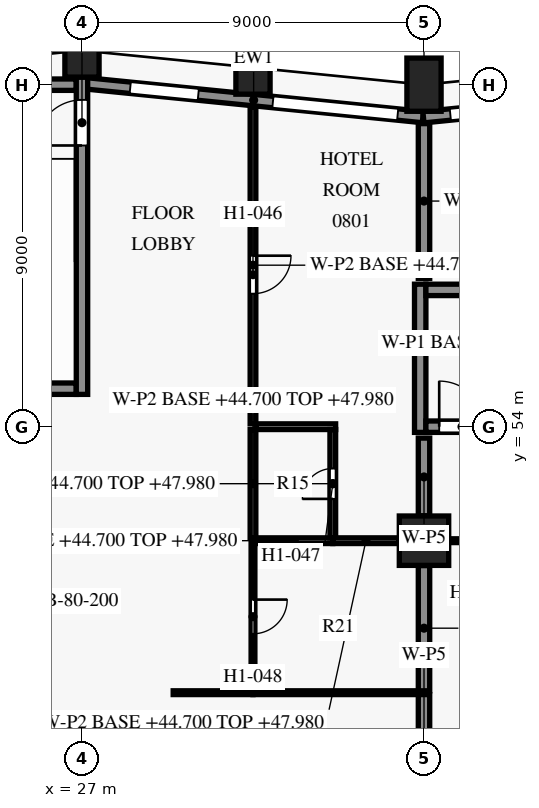
"""IFC4 building model, lengths in metres.
Left out: names, types, materials, properties, quantities, classifications, styles, units other than length and angle.
Written with IfcOpenShell. Run it as: python <this file> out.ifc"""

import sys

from ifc_helpers import new_model, si_unit, direction, frame, frame_2d, origin, origin_2d, place, context, subcontext, project, spatial, rectangle, extrude, element, fill, save


model = new_model("IFC4")
c1 = context("Model", 3, precision=1e-05, world=origin(), true_north=direction((0.0, 1.0)))
c2 = subcontext(c1, "Body", "Model", "MODEL_VIEW")
j1 = project(units=[si_unit("LENGTHUNIT", "METRE"), si_unit("PLANEANGLEUNIT", "RADIAN")], contexts=[c1])
p1 = place(None, origin())
s1 = spatial("IfcSite", under=j1, at=p1, CompositionType="ELEMENT")
p2 = place(p1, origin())
s2 = spatial("IfcBuilding", under=s1, at=p2, CompositionType="ELEMENT")
p3 = place(p2, frame((0.0, 0.0, 44.7)))
s3 = spatial("IfcBuildingStorey", under=s2, at=p3, CompositionType="ELEMENT", Elevation=44.7)
for number, where, z_axis, x_axis in (
    (1, (36.0, 63.0, 0.0), (0.0, 0.0, 1.0), (-1.0, 0.0, 0.0)),
    (2, (31.5, 63.45, 0.0), (0.0, 0.0, 1.0), (-0.995, 0.1, 0.0)),
    (3, (27.0, 63.9, 0.0), (0.0, 0.0, 1.0), (-1.0, 0.0, 0.0)),
):
    element("IfcColumn", number, at=place(p3, frame(where, z_axis=z_axis, x_axis=x_axis)), inside=s3, PredefinedType="COLUMN", context=c2, shape_type="SweptSolid", body=[
        extrude(rectangle(XDim=0.9, YDim=1.4, at=origin_2d()), origin(), (0.0, 0.0, 1.0), 3.6),
    ])
p4 = place(p3, frame((36.0, 51.0, 0.0), z_axis=(0.0, 0.0, 1.0), x_axis=(1.0, 0.0, 0.0)))
e4 = element("IfcColumn", 4, at=p4, inside=s3, PredefinedType="COLUMN", context=c2, shape_type="SweptSolid", body=[
    extrude(rectangle(XDim=1.3, YDim=1.3, at=origin_2d()), origin(), (0.0, 0.0, 1.0), 3.6),
])
p5 = place(p3, frame((35.985, 62.144, 0.0), z_axis=(0.0, 0.0, 1.0), x_axis=(0.995037993253, 0.099495688264, 0.0)))
e5 = element("IfcWall", 5, at=p5, inside=s3, PredefinedType="SOLIDWALL", context=c2, shape_type="SweptSolid", body=[
    extrude(rectangle(XDim=9.03, YDim=0.3, at=frame_2d((4.515, 0.0))), origin(), (0.0, 0.0, 1.0), 2.95),
])
p6 = place(p5, frame((0.711, 0.0, 0.15)))
e6 = element("IfcOpeningElement", 6, at=p6, cuts=e5, PredefinedType="OPENING", context=c2, shape_type="SweptSolid", body=[
    extrude(rectangle(XDim=3.3, YDim=2.4, at=frame_2d((1.65, 1.2))), frame((0.0, 0.16, 0.0), z_axis=(0.0, -1.0, 0.0), x_axis=(1.0, 0.0, 0.0)), (0.0, 0.0, 1.0), 0.32),
])
p7 = place(p5, frame((5.984, 0.0, 0.75)))
e7 = element("IfcOpeningElement", 7, at=p7, cuts=e5, PredefinedType="OPENING", context=c2, shape_type="SweptSolid", body=[
    extrude(rectangle(XDim=1.8, YDim=1.8, at=frame_2d((0.9, 0.9))), frame((0.0, 0.16, 0.0), z_axis=(0.0, -1.0, 0.0), x_axis=(1.0, 0.0, 0.0)), (0.0, 0.0, 1.0), 0.32),
])
p8 = place(p3, frame((27.065, 63.039, 0.0), z_axis=(0.0, 0.0, 1.0), x_axis=(0.995036379926, -0.099511821531, 0.0)))
e8 = element("IfcWall", 8, at=p8, inside=s3, PredefinedType="SOLIDWALL", context=c2, shape_type="SweptSolid", body=[
    extrude(rectangle(XDim=8.95, YDim=0.3, at=frame_2d((4.475, 0.0))), origin(), (0.0, 0.0, 1.0), 2.95),
])
p9 = place(p8, frame((1.211, 0.0, 0.75)))
e9 = element("IfcOpeningElement", 9, at=p9, cuts=e8, PredefinedType="OPENING", context=c2, shape_type="SweptSolid", body=[
    extrude(rectangle(XDim=1.8, YDim=1.8, at=frame_2d((0.9, 0.9))), frame((0.0, 0.16, 0.0), z_axis=(0.0, -1.0, 0.0), x_axis=(1.0, 0.0, 0.0)), (0.0, 0.0, 1.0), 0.32),
])
p10 = place(p8, frame((4.984, 0.0, 0.15)))
e10 = element("IfcOpeningElement", 10, at=p10, cuts=e8, PredefinedType="OPENING", context=c2, shape_type="SweptSolid", body=[
    extrude(rectangle(XDim=3.3, YDim=2.4, at=frame_2d((1.65, 1.2))), frame((0.0, 0.16, 0.0), z_axis=(0.0, -1.0, 0.0), x_axis=(1.0, 0.0, 0.0)), (0.0, 0.0, 1.0), 0.32),
])
p11 = place(p3, frame((36.05, 54.0, 0.0), z_axis=(0.0, 0.0, 1.0), x_axis=(1.0, 0.0, 0.0)))
e11 = element("IfcWall", 11, at=p11, inside=s3, PredefinedType="SHEAR", context=c2, shape_type="SweptSolid", body=[
    extrude(rectangle(XDim=7.7, YDim=0.3, at=frame_2d((3.85, 0.0))), origin(), (0.0, 0.0, 1.0), 3.3),
])
p12 = place(p11, frame((0.35, 0.0, 0.0)))
e12 = element("IfcOpeningElement", 12, at=p12, cuts=e11, PredefinedType="OPENING", context=c2, shape_type="SweptSolid", body=[
    extrude(rectangle(XDim=1.2, YDim=2.2, at=frame_2d((0.6, 1.1))), frame((0.0, 0.16, 0.0), z_axis=(0.0, -1.0, 0.0), x_axis=(1.0, 0.0, 0.0)), (0.0, 0.0, 1.0), 0.32),
])
p13 = place(p3, frame((23.4, 55.0, 0.0), z_axis=(0.0, 0.0, 1.0), x_axis=(1.0, 0.0, 0.0)))
e13 = element("IfcWall", 13, at=p13, inside=s3, PredefinedType="SHEAR", context=c2, shape_type="SweptSolid", body=[
    extrude(rectangle(XDim=3.45, YDim=0.3, at=frame_2d((1.725, 0.0))), origin(), (0.0, 0.0, 1.0), 3.3),
])
p14 = place(p3, frame((36.05, 57.6, 0.0), z_axis=(0.0, 0.0, 1.0), x_axis=(1.0, 0.0, 0.0)))
e14 = element("IfcWall", 14, at=p14, inside=s3, PredefinedType="SHEAR", context=c2, shape_type="SweptSolid", body=[
    extrude(rectangle(XDim=7.7, YDim=0.3, at=frame_2d((3.85, 0.0))), origin(), (0.0, 0.0, 1.0), 3.3),
])
p15 = place(p3, frame((23.55, 63.0, 0.0), z_axis=(0.0, 0.0, 1.0), x_axis=(1.0, 0.0, 0.0)))
e15 = element("IfcWall", 15, at=p15, inside=s3, PredefinedType="SHEAR", context=c2, shape_type="SweptSolid", body=[
    extrude(rectangle(XDim=3.3, YDim=0.3, at=frame_2d((1.65, 0.0))), origin(), (0.0, 0.0, 1.0), 3.3),
])
p16 = place(p3, frame((27.0, 54.85, 0.0), z_axis=(0.0, 0.0, 1.0), x_axis=(0.0, 1.0, 0.0)))
e16 = element("IfcWall", 16, at=p16, inside=s3, PredefinedType="SHEAR", context=c2, shape_type="SweptSolid", body=[
    extrude(rectangle(XDim=8.35, YDim=0.3, at=frame_2d((4.175, 0.0))), origin(), (0.0, 0.0, 1.0), 3.3),
])
p17 = place(p16, frame((6.55, 0.0, 0.0)))
e17 = element("IfcOpeningElement", 17, at=p17, cuts=e16, PredefinedType="OPENING", context=c2, shape_type="SweptSolid", body=[
    extrude(rectangle(XDim=1.2, YDim=2.2, at=frame_2d((0.6, 1.1))), frame((0.0, 0.16, 0.0), z_axis=(0.0, -1.0, 0.0), x_axis=(1.0, 0.0, 0.0)), (0.0, 0.0, 1.0), 0.32),
])
p18 = place(p3, frame((35.9, 53.85, 0.0), z_axis=(0.0, 0.0, 1.0), x_axis=(0.0, 1.0, 0.0)))
e18 = element("IfcWall", 18, at=p18, inside=s3, PredefinedType="SHEAR", context=c2, shape_type="SweptSolid", body=[
    extrude(rectangle(XDim=3.9, YDim=0.3, at=frame_2d((1.95, 0.0))), origin(), (0.0, 0.0, 1.0), 3.3),
])
p19 = place(p3, frame((36.0, 46.95, 0.0), z_axis=(0.0, 0.0, 1.0), x_axis=(0.0, -1.0, 0.0)))
e19 = element("IfcWall", 19, at=p19, inside=s3, PredefinedType="PARTITIONING", context=c2, shape_type="SweptSolid", body=[
    extrude(rectangle(XDim=3.7, YDim=0.3, at=frame_2d((1.85, 0.0))), origin(), (0.0, 0.0, 1.0), 2.58),
])
p20 = place(p19, frame((0.95, 0.0, 0.0)))
e20 = element("IfcOpeningElement", 20, at=p20, cuts=e19, PredefinedType="OPENING", context=c2, shape_type="SweptSolid", body=[
    extrude(rectangle(XDim=1.8, YDim=2.1, at=frame_2d((0.9, 1.05))), frame((0.0, 0.16, 0.0), z_axis=(0.0, -1.0, 0.0), x_axis=(1.0, 0.0, 0.0)), (0.0, 0.0, 1.0), 0.32),
])
p21 = place(p3, frame((29.4, 47.0, 0.0), z_axis=(0.0, 0.0, 1.0), x_axis=(1.0, 0.0, 0.0)))
e21 = element("IfcWall", 21, at=p21, inside=s3, PredefinedType="PARTITIONING", context=c2, shape_type="SweptSolid", body=[
    extrude(rectangle(XDim=2.1, YDim=0.1, at=frame_2d((1.05, 0.0))), origin(), (0.0, 0.0, 1.0), 3.28),
])
p22 = place(p3, frame((31.5, 47.0, 0.0), z_axis=(0.0, 0.0, 1.0), x_axis=(1.0, 0.0, 0.0)))
e22 = element("IfcWall", 22, at=p22, inside=s3, PredefinedType="PARTITIONING", context=c2, shape_type="SweptSolid", body=[
    extrude(rectangle(XDim=4.35, YDim=0.1, at=frame_2d((2.175, 0.0))), origin(), (0.0, 0.0, 1.0), 3.28),
])
p23 = place(p3, frame((36.0, 50.345, 0.0), z_axis=(0.0, 0.0, 1.0), x_axis=(0.0, -1.0, 0.0)))
e23 = element("IfcWall", 23, at=p23, inside=s3, PredefinedType="PARTITIONING", context=c2, shape_type="SweptSolid", body=[
    extrude(rectangle(XDim=3.295, YDim=0.3, at=frame_2d((1.647, 0.0))), origin(), (0.0, 0.0, 1.0), 2.58),
])
p24 = place(p3, frame((31.5, 50.925, 0.0), z_axis=(0.0, 0.0, 1.0), x_axis=(0.0, -1.0, 0.0)))
e24 = element("IfcWall", 24, at=p24, inside=s3, PredefinedType="PARTITIONING", context=c2, shape_type="SweptSolid", body=[
    extrude(rectangle(XDim=3.875, YDim=0.1, at=frame_2d((1.938, 0.0))), origin(), (0.0, 0.0, 1.0), 3.28),
])
p25 = place(p24, frame((1.475, 0.0, 0.0)))
e25 = element("IfcOpeningElement", 25, at=p25, cuts=e24, PredefinedType="OPENING", context=c2, shape_type="SweptSolid", body=[
    extrude(rectangle(XDim=0.9, YDim=2.1, at=frame_2d((0.45, 1.05))), frame((0.0, 0.06, 0.0), z_axis=(0.0, -1.0, 0.0), x_axis=(1.0, 0.0, 0.0)), (0.0, 0.0, 1.0), 0.12),
])
p26 = place(p3, frame((31.575, 51.0, 0.0), z_axis=(0.0, 0.0, 1.0), x_axis=(1.0, 0.0, 0.0)))
e26 = element("IfcWall", 26, at=p26, inside=s3, PredefinedType="PARTITIONING", context=c2, shape_type="SweptSolid", body=[
    extrude(rectangle(XDim=2.025, YDim=0.15, at=frame_2d((1.013, 0.0))), origin(), (0.0, 0.0, 1.0), 3.28),
])
p27 = place(p3, frame((33.6, 51.0, 0.0), z_axis=(0.0, 0.0, 1.0), x_axis=(1.0, 0.0, 0.0)))
e27 = element("IfcWall", 27, at=p27, inside=s3, PredefinedType="PARTITIONING", context=c2, shape_type="SweptSolid", body=[
    extrude(rectangle(XDim=1.745, YDim=0.15, at=frame_2d((0.873, 0.0))), origin(), (0.0, 0.0, 1.0), 3.28),
])
p28 = place(p3, frame((40.5, 51.0, 0.0), z_axis=(0.0, 0.0, 1.0), x_axis=(-1.0, 0.0, 0.0)))
e28 = element("IfcWall", 28, at=p28, inside=s3, PredefinedType="PARTITIONING", context=c2, shape_type="SweptSolid", body=[
    extrude(rectangle(XDim=3.845, YDim=0.1, at=frame_2d((1.922, 0.0))), origin(), (0.0, 0.0, 1.0), 2.58),
])
p29 = place(p28, frame((1.8, 0.0, 0.0)))
e29 = element("IfcOpeningElement", 29, at=p29, cuts=e28, PredefinedType="OPENING", context=c2, shape_type="SweptSolid", body=[
    extrude(rectangle(XDim=0.9, YDim=2.1, at=frame_2d((0.45, 1.05))), frame((0.0, 0.06, 0.0), z_axis=(0.0, -1.0, 0.0), x_axis=(1.0, 0.0, 0.0)), (0.0, 0.0, 1.0), 0.12),
])
p30 = place(p3, frame((33.6, 51.075, 0.0), z_axis=(0.0, 0.0, 1.0), x_axis=(0.0, 1.0, 0.0)))
e30 = element("IfcWall", 30, at=p30, inside=s3, PredefinedType="PARTITIONING", context=c2, shape_type="SweptSolid", body=[
    extrude(rectangle(XDim=2.85, YDim=0.15, at=frame_2d((1.425, 0.0))), origin(), (0.0, 0.0, 1.0), 3.28),
])
p31 = place(p30, frame((1.025, 0.0, 0.0)))
e31 = element("IfcOpeningElement", 31, at=p31, cuts=e30, PredefinedType="OPENING", context=c2, shape_type="SweptSolid", body=[
    extrude(rectangle(XDim=0.8, YDim=2.1, at=frame_2d((0.4, 1.05))), frame((0.0, 0.085, 0.0), z_axis=(0.0, -1.0, 0.0), x_axis=(1.0, 0.0, 0.0)), (0.0, 0.0, 1.0), 0.17),
])
p32 = place(p3, frame((36.0, 53.7, 0.0), z_axis=(0.0, 0.0, 1.0), x_axis=(0.0, -1.0, 0.0)))
e32 = element("IfcWall", 32, at=p32, inside=s3, PredefinedType="PARTITIONING", context=c2, shape_type="SweptSolid", body=[
    extrude(rectangle(XDim=2.045, YDim=0.3, at=frame_2d((1.022, 0.0))), origin(), (0.0, 0.0, 1.0), 2.58),
])
p33 = place(p3, frame((31.5, 53.925, 0.0), z_axis=(0.0, 0.0, 1.0), x_axis=(0.0, -1.0, 0.0)))
e33 = element("IfcWall", 33, at=p33, inside=s3, PredefinedType="PARTITIONING", context=c2, shape_type="SweptSolid", body=[
    extrude(rectangle(XDim=2.85, YDim=0.15, at=frame_2d((1.425, 0.0))), origin(), (0.0, 0.0, 1.0), 3.28),
])
p34 = place(p3, frame((33.675, 54.0, 0.0), z_axis=(0.0, 0.0, 1.0), x_axis=(-1.0, 0.0, 0.0)))
e34 = element("IfcWall", 34, at=p34, inside=s3, PredefinedType="PARTITIONING", context=c2, shape_type="SweptSolid", body=[
    extrude(rectangle(XDim=2.1, YDim=0.15, at=frame_2d((1.05, 0.0))), origin(), (0.0, 0.0, 1.0), 3.28),
])
p35 = place(p3, frame((36.0, 61.975, 0.0), z_axis=(0.0, 0.0, 1.0), x_axis=(0.0, -1.0, 0.0)))
e35 = element("IfcWall", 35, at=p35, inside=s3, PredefinedType="PARTITIONING", context=c2, shape_type="SweptSolid", body=[
    extrude(rectangle(XDim=4.075, YDim=0.3, at=frame_2d((2.038, 0.0))), origin(), (0.0, 0.0, 1.0), 2.58),
])
p36 = place(p3, frame((31.5, 62.425, 0.0), z_axis=(0.0, 0.0, 1.0), x_axis=(0.0, -1.0, 0.0)))
e36 = element("IfcWall", 36, at=p36, inside=s3, PredefinedType="PARTITIONING", context=c2, shape_type="SweptSolid", body=[
    extrude(rectangle(XDim=8.35, YDim=0.15, at=frame_2d((4.175, 0.0))), origin(), (0.0, 0.0, 1.0), 3.28),
])
p37 = place(p36, frame((3.925, 0.0, 0.0)))
e37 = element("IfcOpeningElement", 37, at=p37, cuts=e36, PredefinedType="OPENING", context=c2, shape_type="SweptSolid", body=[
    extrude(rectangle(XDim=1.0, YDim=2.1, at=frame_2d((0.5, 1.05))), frame((0.0, 0.085, 0.0), z_axis=(0.0, -1.0, 0.0), x_axis=(1.0, 0.0, 0.0)), (0.0, 0.0, 1.0), 0.17),
])
p38 = place(p6, origin())
e38 = element("IfcWindow", 38, at=p38, inside=s3, PartitioningType="SINGLE_PANEL", PredefinedType="WINDOW", context=c2, shape_type="SweptSolid", body=[
    extrude(rectangle(XDim=3.3, YDim=2.4, at=frame_2d((1.65, 1.2))), frame((0.0, 0.03, 0.0), z_axis=(0.0, -1.0, 0.0), x_axis=(1.0, 0.0, 0.0)), (0.0, 0.0, 1.0), 0.06),
])
fill(e6, e38)
p39 = place(p9, origin())
e39 = element("IfcWindow", 39, at=p39, inside=s3, PartitioningType="SINGLE_PANEL", PredefinedType="WINDOW", context=c2, shape_type="SweptSolid", body=[
    extrude(rectangle(XDim=1.8, YDim=1.8, at=frame_2d((0.9, 0.9))), frame((0.0, 0.03, 0.0), z_axis=(0.0, -1.0, 0.0), x_axis=(1.0, 0.0, 0.0)), (0.0, 0.0, 1.0), 0.06),
])
fill(e9, e39)
p40 = place(p10, origin())
e40 = element("IfcWindow", 40, at=p40, inside=s3, PartitioningType="SINGLE_PANEL", PredefinedType="WINDOW", context=c2, shape_type="SweptSolid", body=[
    extrude(rectangle(XDim=3.3, YDim=2.4, at=frame_2d((1.65, 1.2))), frame((0.0, 0.03, 0.0), z_axis=(0.0, -1.0, 0.0), x_axis=(1.0, 0.0, 0.0)), (0.0, 0.0, 1.0), 0.06),
])
fill(e10, e40)
p41 = place(p17, origin())
e41 = element("IfcDoor", 41, at=p41, inside=s3, OperationType="SINGLE_SWING_LEFT", PredefinedType="DOOR", context=c2, shape_type="SweptSolid", body=[
    extrude(rectangle(XDim=1.2, YDim=2.2, at=frame_2d((0.6, 1.1))), frame((0.0, 0.025, 0.0), z_axis=(0.0, -1.0, 0.0), x_axis=(1.0, 0.0, 0.0)), (0.0, 0.0, 1.0), 0.05),
])
fill(e17, e41)
p42 = place(p12, origin())
e42 = element("IfcDoor", 42, at=p42, inside=s3, OperationType="SINGLE_SWING_LEFT", PredefinedType="DOOR", context=c2, shape_type="SweptSolid", body=[
    extrude(rectangle(XDim=1.2, YDim=2.2, at=frame_2d((0.6, 1.1))), frame((0.0, 0.025, 0.0), z_axis=(0.0, -1.0, 0.0), x_axis=(1.0, 0.0, 0.0)), (0.0, 0.0, 1.0), 0.05),
])
fill(e12, e42)
p43 = place(p37, origin())
e43 = element("IfcDoor", 43, at=p43, inside=s3, OperationType="SINGLE_SWING_LEFT", PredefinedType="DOOR", context=c2, shape_type="SweptSolid", body=[
    extrude(rectangle(XDim=1.0, YDim=2.1, at=frame_2d((0.5, 1.05))), frame((0.0, 0.025, 0.0), z_axis=(0.0, -1.0, 0.0), x_axis=(1.0, 0.0, 0.0)), (0.0, 0.0, 1.0), 0.05),
])
fill(e37, e43)
p44 = place(p31, origin())
e44 = element("IfcDoor", 44, at=p44, inside=s3, OperationType="SINGLE_SWING_LEFT", PredefinedType="DOOR", context=c2, shape_type="SweptSolid", body=[
    extrude(rectangle(XDim=0.8, YDim=2.1, at=frame_2d((0.4, 1.05))), frame((0.0, 0.025, 0.0), z_axis=(0.0, -1.0, 0.0), x_axis=(1.0, 0.0, 0.0)), (0.0, 0.0, 1.0), 0.05),
])
fill(e31, e44)
p45 = place(p25, origin())
e45 = element("IfcDoor", 45, at=p45, inside=s3, OperationType="SINGLE_SWING_LEFT", PredefinedType="DOOR", context=c2, shape_type="SweptSolid", body=[
    extrude(rectangle(XDim=0.9, YDim=2.1, at=frame_2d((0.45, 1.05))), frame((0.0, 0.025, 0.0), z_axis=(0.0, -1.0, 0.0), x_axis=(1.0, 0.0, 0.0)), (0.0, 0.0, 1.0), 0.05),
])
fill(e25, e45)
save(model, sys.argv[1])
